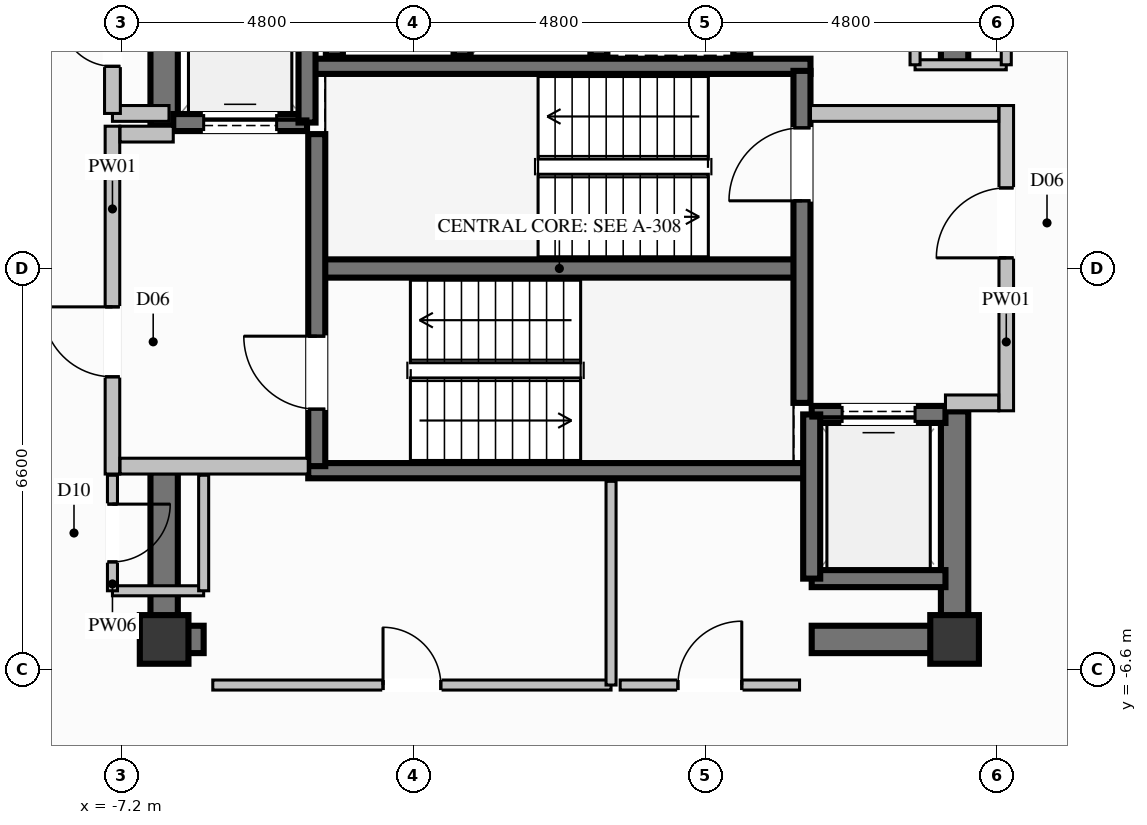
"""IFC4 building model, lengths in metres.
Left out: names, types, materials, properties, quantities, classifications, styles, units other than length and angle.
Written with IfcOpenShell. Run it as: python <this file> out.ifc"""

import sys

from ifc_helpers import new_model, si_unit, direction, frame, frame_2d, origin, origin_2d, place, context, subcontext, project, spatial, rectangle, extrude, element, fill, save


model = new_model("IFC4")
c1 = context("Model", 3, precision=1e-05, world=origin(), true_north=direction((0.0, 1.0)))
c2 = subcontext(c1, "Body", "Model", "MODEL_VIEW")
j1 = project(units=[si_unit("LENGTHUNIT", "METRE"), si_unit("PLANEANGLEUNIT", "RADIAN")], contexts=[c1])
p1 = place(None, origin())
s1 = spatial("IfcSite", under=j1, at=p1, CompositionType="ELEMENT")
p2 = place(p1, origin())
s2 = spatial("IfcBuilding", under=s1, at=p2, CompositionType="ELEMENT")
p3 = place(p2, frame((0.0, 0.0, 258.2)))
s3 = spatial("IfcBuildingStorey", under=s2, at=p3, CompositionType="ELEMENT", Elevation=258.2)
for number, where, z_axis, x_axis in (
    (1, (-6.5, -6.1, 0.0), (0.0, 0.0, 1.0), (1.0, 0.0, 0.0)),
    (2, (6.5, -6.1, 0.0), (0.0, 0.0, 1.0), (1.0, 0.0, 0.0)),
):
    element("IfcColumn", number, at=place(p3, frame(where, z_axis=z_axis, x_axis=x_axis)), inside=s3, PredefinedType="COLUMN", context=c2, shape_type="SweptSolid", body=[
        extrude(rectangle(XDim=0.8, YDim=0.8, at=origin_2d()), origin(), (0.0, 0.0, 1.0), 3.8),
    ])
p4 = place(p3, frame((-3.99, 0.0, 0.0), z_axis=(0.0, 0.0, 1.0), x_axis=(1.0, 0.0, 0.0)))
e3 = element("IfcWall", 3, at=p4, inside=s3, PredefinedType="SHEAR", context=c2, shape_type="SweptSolid", body=[
    extrude(rectangle(XDim=7.98, YDim=0.3, at=frame_2d((3.99, 0.0))), origin(), (0.0, 0.0, 1.0), 3.8),
])
for number, where, z_axis, x_axis in (
    (4, (-4.13, -3.325, 0.0), (0.0, 0.0, 1.0), (1.0, 0.0, 0.0)),
    (5, (-4.13, 3.325, 0.0), (0.0, 0.0, 1.0), (1.0, 0.0, 0.0)),
):
    element("IfcWall", number, at=place(p3, frame(where, z_axis=z_axis, x_axis=x_axis)), inside=s3, PredefinedType="SOLIDWALL", context=c2, shape_type="SweptSolid", body=[
        extrude(rectangle(XDim=8.26, YDim=0.25, at=frame_2d((4.13, 0.0))), origin(), (0.0, 0.0, 1.0), 3.8),
    ])
p5 = place(p3, frame((-6.275, -6.1, 0.0), z_axis=(0.0, 0.0, 1.0), x_axis=(1.0, 0.0, 0.0)))
e6 = element("IfcWall", 6, at=p5, inside=s3, PredefinedType="SHEAR", context=c2, shape_type="SweptSolid", body=[
    extrude(rectangle(XDim=0.425, YDim=0.45, at=frame_2d((0.212, 0.0))), origin(), (0.0, 0.0, 1.0), 3.8),
])
p6 = place(p3, frame((4.15, -6.1, 0.0), z_axis=(0.0, 0.0, 1.0), x_axis=(1.0, 0.0, 0.0)))
e7 = element("IfcWall", 7, at=p6, inside=s3, PredefinedType="SHEAR", context=c2, shape_type="SweptSolid", body=[
    extrude(rectangle(XDim=2.125, YDim=0.45, at=frame_2d((1.062, 0.0))), origin(), (0.0, 0.0, 1.0), 3.8),
])
p7 = place(p3, frame((-6.5, 2.35, 0.0), z_axis=(0.0, 0.0, 1.0), x_axis=(0.0, 1.0, 0.0)))
e8 = element("IfcWall", 8, at=p7, inside=s3, PredefinedType="SHEAR", context=c2, shape_type="SweptSolid", body=[
    extrude(rectangle(XDim=3.975, YDim=0.45, at=frame_2d((1.987, 0.0))), origin(), (0.0, 0.0, 1.0), 3.8),
])
p8 = place(p3, frame((-6.5, -6.325, 0.0), z_axis=(0.0, 0.0, 1.0), x_axis=(0.0, 1.0, 0.0)))
e9 = element("IfcWall", 9, at=p8, inside=s3, PredefinedType="SHEAR", context=c2, shape_type="SweptSolid", body=[
    extrude(rectangle(XDim=2.975, YDim=0.45, at=frame_2d((1.487, 0.0))), origin(), (0.0, 0.0, 1.0), 3.8),
])
p9 = place(p3, frame((6.5, -6.325, 0.0), z_axis=(0.0, 0.0, 1.0), x_axis=(0.0, 1.0, 0.0)))
e10 = element("IfcWall", 10, at=p9, inside=s3, PredefinedType="SHEAR", context=c2, shape_type="SweptSolid", body=[
    extrude(rectangle(XDim=3.975, YDim=0.45, at=frame_2d((1.987, 0.0))), origin(), (0.0, 0.0, 1.0), 3.8),
])
p10 = place(p3, frame((6.5, 3.35, 0.0), z_axis=(0.0, 0.0, 1.0), x_axis=(0.0, 1.0, 0.0)))
e11 = element("IfcWall", 11, at=p10, inside=s3, PredefinedType="SHEAR", context=c2, shape_type="SweptSolid", body=[
    extrude(rectangle(XDim=2.975, YDim=0.45, at=frame_2d((1.487, 0.0))), origin(), (0.0, 0.0, 1.0), 3.8),
])
for number, where, z_axis, x_axis in (
    (12, (-3.7, 6.0, 0.0), (0.0, 0.0, 1.0), (0.0, -1.0, 0.0)),
    (13, (-1.6, 3.5, 0.0), (0.0, 0.0, 1.0), (0.0, 1.0, 0.0)),
    (14, (0.65, 3.5, 0.0), (0.0, 0.0, 1.0), (0.0, 1.0, 0.0)),
    (15, (3.0, 3.5, 0.0), (0.0, 0.0, 1.0), (0.0, 1.0, 0.0)),
):
    element("IfcWall", number, at=place(p3, frame(where, z_axis=z_axis, x_axis=x_axis)), inside=s3, PredefinedType="SOLIDWALL", context=c2, shape_type="SweptSolid", body=[
        extrude(rectangle(XDim=2.5, YDim=0.28, at=frame_2d((1.25, 0.0))), origin(), (0.0, 0.0, 1.0), 3.57),
    ])
p11 = place(p3, frame((-6.35, 2.4, 0.0), z_axis=(0.0, 0.0, 1.0), x_axis=(1.0, 0.0, 0.0)))
e16 = element("IfcWall", 16, at=p11, inside=s3, PredefinedType="SOLIDWALL", context=c2, shape_type="SweptSolid", body=[
    extrude(rectangle(XDim=2.2, YDim=0.28, at=frame_2d((1.1, 0.0))), origin(), (0.0, 0.0, 1.0), 3.57),
])
p12 = place(p11, frame((0.5, 0.0, 0.0)))
e17 = element("IfcOpeningElement", 17, at=p12, cuts=e16, PredefinedType="OPENING", context=c2, shape_type="SweptSolid", body=[
    extrude(rectangle(XDim=1.2, YDim=2.2, at=frame_2d((0.6, 1.1))), frame((0.0, 0.15, 0.0), z_axis=(0.0, -1.0, 0.0), x_axis=(1.0, 0.0, 0.0)), (0.0, 0.0, 1.0), 0.3),
])
p13 = place(p3, frame((-4.15, 2.4, 0.0), z_axis=(0.0, 0.0, 1.0), x_axis=(0.0, 1.0, 0.0)))
e18 = element("IfcWall", 18, at=p13, inside=s3, PredefinedType="SOLIDWALL", context=c2, shape_type="SweptSolid", body=[
    extrude(rectangle(XDim=2.7, YDim=0.28, at=frame_2d((1.35, 0.0))), origin(), (0.0, 0.0, 1.0), 3.57),
])
p14 = place(p3, frame((4.15, -5.1, 0.0), z_axis=(0.0, 0.0, 1.0), x_axis=(1.0, 0.0, 0.0)))
e19 = element("IfcWall", 19, at=p14, inside=s3, PredefinedType="SOLIDWALL", context=c2, shape_type="SweptSolid", body=[
    extrude(rectangle(XDim=2.2, YDim=0.28, at=frame_2d((1.1, 0.0))), origin(), (0.0, 0.0, 1.0), 3.57),
])
p15 = place(p3, frame((6.35, -2.4, 0.0), z_axis=(0.0, 0.0, 1.0), x_axis=(-1.0, 0.0, 0.0)))
e20 = element("IfcWall", 20, at=p15, inside=s3, PredefinedType="SOLIDWALL", context=c2, shape_type="SweptSolid", body=[
    extrude(rectangle(XDim=2.2, YDim=0.28, at=frame_2d((1.1, 0.0))), origin(), (0.0, 0.0, 1.0), 3.57),
])
p16 = place(p15, frame((0.5, 0.0, 0.0)))
e21 = element("IfcOpeningElement", 21, at=p16, cuts=e20, PredefinedType="OPENING", context=c2, shape_type="SweptSolid", body=[
    extrude(rectangle(XDim=1.2, YDim=2.2, at=frame_2d((0.6, 1.1))), frame((0.0, 0.15, 0.0), z_axis=(0.0, -1.0, 0.0), x_axis=(1.0, 0.0, 0.0)), (0.0, 0.0, 1.0), 0.3),
])
p17 = place(p3, frame((4.15, -2.4, 0.0), z_axis=(0.0, 0.0, 1.0), x_axis=(0.0, -1.0, 0.0)))
e22 = element("IfcWall", 22, at=p17, inside=s3, PredefinedType="SOLIDWALL", context=c2, shape_type="SweptSolid", body=[
    extrude(rectangle(XDim=2.7, YDim=0.28, at=frame_2d((1.35, 0.0))), origin(), (0.0, 0.0, 1.0), 3.57),
])
p18 = place(p3, frame((-3.99, -3.25, 0.0), z_axis=(0.0, 0.0, 1.0), x_axis=(0.0, 1.0, 0.0)))
e23 = element("IfcWall", 23, at=p18, inside=s3, PredefinedType="SOLIDWALL", context=c2, shape_type="SweptSolid", body=[
    extrude(rectangle(XDim=5.46, YDim=0.28, at=frame_2d((2.73, 0.0))), origin(), (0.0, 0.0, 1.0), 3.57),
])
p19 = place(p18, frame((0.937, 0.0, 0.0)))
e24 = element("IfcOpeningElement", 24, at=p19, cuts=e23, PredefinedType="OPENING", context=c2, shape_type="SweptSolid", body=[
    extrude(rectangle(XDim=1.2, YDim=2.2, at=frame_2d((0.6, 1.1))), frame((0.0, 0.15, 0.0), z_axis=(0.0, -1.0, 0.0), x_axis=(1.0, 0.0, 0.0)), (0.0, 0.0, 1.0), 0.3),
])
p20 = place(p3, frame((3.99, -2.21, 0.0), z_axis=(0.0, 0.0, 1.0), x_axis=(0.0, 1.0, 0.0)))
e25 = element("IfcWall", 25, at=p20, inside=s3, PredefinedType="SOLIDWALL", context=c2, shape_type="SweptSolid", body=[
    extrude(rectangle(XDim=5.46, YDim=0.28, at=frame_2d((2.73, 0.0))), origin(), (0.0, 0.0, 1.0), 3.57),
])
p21 = place(p20, frame((3.323, 0.0, 0.0)))
e26 = element("IfcOpeningElement", 26, at=p21, cuts=e25, PredefinedType="OPENING", context=c2, shape_type="SweptSolid", body=[
    extrude(rectangle(XDim=1.2, YDim=2.2, at=frame_2d((0.6, 1.1))), frame((0.0, 0.15, 0.0), z_axis=(0.0, -1.0, 0.0), x_axis=(1.0, 0.0, 0.0)), (0.0, 0.0, 1.0), 0.3),
])
p22 = place(p3, frame((-7.35, -3.38, 0.0), z_axis=(0.0, 0.0, 1.0), x_axis=(0.0, 1.0, 0.0)))
e27 = element("IfcWall", 27, at=p22, inside=s3, PredefinedType="PARTITIONING", context=c2, shape_type="SweptSolid", body=[
    extrude(rectangle(XDim=5.72, YDim=0.24, at=frame_2d((2.86, 0.0))), origin(), (0.0, 0.0, 1.0), 2.655),
])
p23 = place(p22, frame((1.599, 0.0, 0.0)))
e28 = element("IfcOpeningElement", 28, at=p23, cuts=e27, PredefinedType="OPENING", context=c2, shape_type="SweptSolid", body=[
    extrude(rectangle(XDim=1.15, YDim=2.2, at=frame_2d((0.575, 1.1))), frame((0.0, 0.13, 0.0), z_axis=(0.0, -1.0, 0.0), x_axis=(1.0, 0.0, 0.0)), (0.0, 0.0, 1.0), 0.26),
])
p24 = place(p3, frame((-7.225, -3.25, 0.0), z_axis=(0.0, 0.0, 1.0), x_axis=(1.0, 0.0, 0.0)))
e29 = element("IfcWall", 29, at=p24, inside=s3, PredefinedType="PARTITIONING", context=c2, shape_type="SweptSolid", body=[
    extrude(rectangle(XDim=3.095, YDim=0.26, at=frame_2d((1.548, 0.0))), origin(), (0.0, 0.0, 1.0), 3.57),
])
p25 = place(p3, frame((-7.225, 2.21, 0.0), z_axis=(0.0, 0.0, 1.0), x_axis=(1.0, 0.0, 0.0)))
e30 = element("IfcWall", 30, at=p25, inside=s3, PredefinedType="PARTITIONING", context=c2, shape_type="SweptSolid", body=[
    extrude(rectangle(XDim=0.875, YDim=0.26, at=frame_2d((0.438, 0.0))), origin(), (0.0, 0.0, 1.0), 3.57),
])
p26 = place(p3, frame((7.35, -2.34, 0.0), z_axis=(0.0, 0.0, 1.0), x_axis=(0.0, 1.0, 0.0)))
e31 = element("IfcWall", 31, at=p26, inside=s3, PredefinedType="PARTITIONING", context=c2, shape_type="SweptSolid", body=[
    extrude(rectangle(XDim=5.02, YDim=0.24, at=frame_2d((2.51, 0.0))), origin(), (0.0, 0.0, 1.0), 2.655),
])
p27 = place(p26, frame((2.515, 0.0, 0.0)))
e32 = element("IfcOpeningElement", 32, at=p27, cuts=e31, PredefinedType="OPENING", context=c2, shape_type="SweptSolid", body=[
    extrude(rectangle(XDim=1.15, YDim=2.2, at=frame_2d((0.575, 1.1))), frame((0.0, 0.13, 0.0), z_axis=(0.0, -1.0, 0.0), x_axis=(1.0, 0.0, 0.0)), (0.0, 0.0, 1.0), 0.26),
])
p28 = place(p3, frame((6.35, -2.21, 0.0), z_axis=(0.0, 0.0, 1.0), x_axis=(1.0, 0.0, 0.0)))
e33 = element("IfcWall", 33, at=p28, inside=s3, PredefinedType="PARTITIONING", context=c2, shape_type="SweptSolid", body=[
    extrude(rectangle(XDim=0.875, YDim=0.26, at=frame_2d((0.438, 0.0))), origin(), (0.0, 0.0, 1.0), 3.57),
])
p29 = place(p3, frame((4.13, 2.55, 0.0), z_axis=(0.0, 0.0, 1.0), x_axis=(1.0, 0.0, 0.0)))
e34 = element("IfcWall", 34, at=p29, inside=s3, PredefinedType="PARTITIONING", context=c2, shape_type="SweptSolid", body=[
    extrude(rectangle(XDim=3.095, YDim=0.26, at=frame_2d((1.548, 0.0))), origin(), (0.0, 0.0, 1.0), 3.57),
])
p30 = place(p3, frame((-7.35, 2.55, 0.0), z_axis=(0.0, 0.0, 1.0), x_axis=(1.0, 0.0, 0.0)))
e35 = element("IfcWall", 35, at=p30, inside=s3, PredefinedType="PARTITIONING", context=c2, shape_type="SweptSolid", body=[
    extrude(rectangle(XDim=0.93, YDim=0.26, at=frame_2d((0.465, 0.0))), origin(), (0.0, 0.0, 1.0), 3.57),
])
p31 = place(p3, frame((-7.35, 2.55, 0.0), z_axis=(0.0, 0.0, 1.0), x_axis=(0.0, 1.0, 0.0)))
e36 = element("IfcWall", 36, at=p31, inside=s3, PredefinedType="PARTITIONING", context=c2, shape_type="SweptSolid", body=[
    extrude(rectangle(XDim=2.4, YDim=0.26, at=frame_2d((1.2, 0.0))), origin(), (0.0, 0.0, 1.0), 2.655),
])
p32 = place(p31, frame((0.775, 0.0, 0.0)))
e37 = element("IfcOpeningElement", 37, at=p32, cuts=e36, PredefinedType="OPENING", context=c2, shape_type="SweptSolid", body=[
    extrude(rectangle(XDim=0.85, YDim=2.05, at=frame_2d((0.425, 1.025))), frame((0.0, 0.14, 0.0), z_axis=(0.0, -1.0, 0.0), x_axis=(1.0, 0.0, 0.0)), (0.0, 0.0, 1.0), 0.28),
])
p33 = place(p3, frame((-7.35, -5.3, 0.0), z_axis=(0.0, 0.0, 1.0), x_axis=(1.0, 0.0, 0.0)))
e38 = element("IfcWall", 38, at=p33, inside=s3, PredefinedType="PARTITIONING", context=c2, shape_type="SweptSolid", body=[
    extrude(rectangle(XDim=1.5, YDim=0.165, at=frame_2d((0.75, 0.0))), origin(), (0.0, 0.0, 1.0), 2.655),
])
p34 = place(p3, frame((-5.85, -5.3, 0.0), z_axis=(0.0, 0.0, 1.0), x_axis=(0.0, 1.0, 0.0)))
e39 = element("IfcWall", 39, at=p34, inside=s3, PredefinedType="PARTITIONING", context=c2, shape_type="SweptSolid", body=[
    extrude(rectangle(XDim=1.9, YDim=0.165, at=frame_2d((0.95, 0.0))), origin(), (0.0, 0.0, 1.0), 2.655),
])
p35 = place(p3, frame((-7.35, -3.4, 0.0), z_axis=(0.0, 0.0, 1.0), x_axis=(0.0, -1.0, 0.0)))
e40 = element("IfcWall", 40, at=p35, inside=s3, PredefinedType="PARTITIONING", context=c2, shape_type="SweptSolid", body=[
    extrude(rectangle(XDim=1.9, YDim=0.165, at=frame_2d((0.95, 0.0))), origin(), (0.0, 0.0, 1.0), 3.57),
])
p36 = place(p35, frame((0.475, 0.0, 0.0)))
e41 = element("IfcOpeningElement", 41, at=p36, cuts=e40, PredefinedType="OPENING", context=c2, shape_type="SweptSolid", body=[
    extrude(rectangle(XDim=0.95, YDim=2.1, at=frame_2d((0.475, 1.05))), frame((0.0, 0.093, 0.0), z_axis=(0.0, -1.0, 0.0), x_axis=(1.0, 0.0, 0.0)), (0.0, 0.0, 1.0), 0.185),
])
p37 = place(p3, frame((5.85, 3.35, 0.0), z_axis=(0.0, 0.0, 1.0), x_axis=(1.0, 0.0, 0.0)))
e42 = element("IfcWall", 42, at=p37, inside=s3, PredefinedType="PARTITIONING", context=c2, shape_type="SweptSolid", body=[
    extrude(rectangle(XDim=1.5, YDim=0.165, at=frame_2d((0.75, 0.0))), origin(), (0.0, 0.0, 1.0), 3.57),
])
p38 = place(p3, frame((7.35, 3.35, 0.0), z_axis=(0.0, 0.0, 1.0), x_axis=(0.0, 1.0, 0.0)))
e43 = element("IfcWall", 43, at=p38, inside=s3, PredefinedType="PARTITIONING", context=c2, shape_type="SweptSolid", body=[
    extrude(rectangle(XDim=1.95, YDim=0.165, at=frame_2d((0.975, 0.0))), origin(), (0.0, 0.0, 1.0), 3.57),
])
p39 = place(p38, frame((0.5, 0.0, 0.0)))
e44 = element("IfcOpeningElement", 44, at=p39, cuts=e43, PredefinedType="OPENING", context=c2, shape_type="SweptSolid", body=[
    extrude(rectangle(XDim=0.95, YDim=2.1, at=frame_2d((0.475, 1.05))), frame((0.0, 0.093, 0.0), z_axis=(0.0, -1.0, 0.0), x_axis=(1.0, 0.0, 0.0)), (0.0, 0.0, 1.0), 0.185),
])
p40 = place(p3, frame((5.85, 5.3, 0.0), z_axis=(0.0, 0.0, 1.0), x_axis=(0.0, -1.0, 0.0)))
e45 = element("IfcWall", 45, at=p40, inside=s3, PredefinedType="PARTITIONING", context=c2, shape_type="SweptSolid", body=[
    extrude(rectangle(XDim=1.95, YDim=0.165, at=frame_2d((0.975, 0.0))), origin(), (0.0, 0.0, 1.0), 2.655),
])
p41 = place(p3, frame((-5.7, -6.85, 0.0), z_axis=(0.0, 0.0, 1.0), x_axis=(1.0, 0.0, 0.0)))
e46 = element("IfcWall", 46, at=p41, inside=s3, PredefinedType="PARTITIONING", context=c2, shape_type="SweptSolid", body=[
    extrude(rectangle(XDim=6.55, YDim=0.165, at=frame_2d((3.275, 0.0))), origin(), (0.0, 0.0, 1.0), 2.655),
])
p42 = place(p41, frame((2.8, 0.0, 0.0)))
e47 = element("IfcOpeningElement", 47, at=p42, cuts=e46, PredefinedType="OPENING", context=c2, shape_type="SweptSolid", body=[
    extrude(rectangle(XDim=0.95, YDim=2.1, at=frame_2d((0.475, 1.05))), frame((0.0, 0.093, 0.0), z_axis=(0.0, -1.0, 0.0), x_axis=(1.0, 0.0, 0.0)), (0.0, 0.0, 1.0), 0.185),
])
p43 = place(p3, frame((0.85, -6.85, 0.0), z_axis=(0.0, 0.0, 1.0), x_axis=(0.0, 1.0, 0.0)))
e48 = element("IfcWall", 48, at=p43, inside=s3, PredefinedType="PARTITIONING", context=c2, shape_type="SweptSolid", body=[
    extrude(rectangle(XDim=3.35, YDim=0.165, at=frame_2d((1.675, 0.0))), origin(), (0.0, 0.0, 1.0), 2.449),
])
p44 = place(p3, frame((1.0, -6.85, 0.0), z_axis=(0.0, 0.0, 1.0), x_axis=(1.0, 0.0, 0.0)))
e49 = element("IfcWall", 49, at=p44, inside=s3, PredefinedType="PARTITIONING", context=c2, shape_type="SweptSolid", body=[
    extrude(rectangle(XDim=2.95, YDim=0.165, at=frame_2d((1.475, 0.0))), origin(), (0.0, 0.0, 1.0), 2.655),
])
p45 = place(p44, frame((0.95, 0.0, 0.0)))
e50 = element("IfcOpeningElement", 50, at=p45, cuts=e49, PredefinedType="OPENING", context=c2, shape_type="SweptSolid", body=[
    extrude(rectangle(XDim=1.05, YDim=2.15, at=frame_2d((0.525, 1.075))), frame((0.0, 0.093, 0.0), z_axis=(0.0, -1.0, 0.0), x_axis=(1.0, 0.0, 0.0)), (0.0, 0.0, 1.0), 0.185),
])
p46 = place(p12, origin())
e51 = element("IfcDoor", 51, at=p46, inside=s3, OperationType="SLIDING_TO_LEFT", PredefinedType="DOOR", context=c2, shape_type="SweptSolid", body=[
    extrude(rectangle(XDim=1.2, YDim=2.2, at=frame_2d((0.6, 1.1))), frame((0.0, 0.025, 0.0), z_axis=(0.0, -1.0, 0.0), x_axis=(1.0, 0.0, 0.0)), (0.0, 0.0, 1.0), 0.05),
])
fill(e17, e51)
p47 = place(p16, origin())
e52 = element("IfcDoor", 52, at=p47, inside=s3, OperationType="SLIDING_TO_LEFT", PredefinedType="DOOR", context=c2, shape_type="SweptSolid", body=[
    extrude(rectangle(XDim=1.2, YDim=2.2, at=frame_2d((0.6, 1.1))), frame((0.0, 0.025, 0.0), z_axis=(0.0, -1.0, 0.0), x_axis=(1.0, 0.0, 0.0)), (0.0, 0.0, 1.0), 0.05),
])
fill(e21, e52)
p48 = place(p19, origin())
e53 = element("IfcDoor", 53, at=p48, inside=s3, OperationType="SINGLE_SWING_RIGHT", PredefinedType="DOOR", context=c2, shape_type="SweptSolid", body=[
    extrude(rectangle(XDim=1.2, YDim=2.2, at=frame_2d((0.6, 1.1))), frame((0.0, 0.025, 0.0), z_axis=(0.0, -1.0, 0.0), x_axis=(1.0, 0.0, 0.0)), (0.0, 0.0, 1.0), 0.05),
])
fill(e24, e53)
p49 = place(p21, origin())
e54 = element("IfcDoor", 54, at=p49, inside=s3, OperationType="SINGLE_SWING_LEFT", PredefinedType="DOOR", context=c2, shape_type="SweptSolid", body=[
    extrude(rectangle(XDim=1.2, YDim=2.2, at=frame_2d((0.6, 1.1))), frame((0.0, 0.025, 0.0), z_axis=(0.0, -1.0, 0.0), x_axis=(1.0, 0.0, 0.0)), (0.0, 0.0, 1.0), 0.05),
])
fill(e26, e54)
p50 = place(p23, origin())
e55 = element("IfcDoor", 55, at=p50, inside=s3, OperationType="SINGLE_SWING_RIGHT", PredefinedType="DOOR", context=c2, shape_type="SweptSolid", body=[
    extrude(rectangle(XDim=1.15, YDim=2.2, at=frame_2d((0.575, 1.1))), frame((0.0, 0.025, 0.0), z_axis=(0.0, -1.0, 0.0), x_axis=(1.0, 0.0, 0.0)), (0.0, 0.0, 1.0), 0.05),
])
fill(e28, e55)
p51 = place(p27, origin())
e56 = element("IfcDoor", 56, at=p51, inside=s3, OperationType="SINGLE_SWING_LEFT", PredefinedType="DOOR", context=c2, shape_type="SweptSolid", body=[
    extrude(rectangle(XDim=1.15, YDim=2.2, at=frame_2d((0.575, 1.1))), frame((0.0, 0.025, 0.0), z_axis=(0.0, -1.0, 0.0), x_axis=(1.0, 0.0, 0.0)), (0.0, 0.0, 1.0), 0.05),
])
fill(e32, e56)
p52 = place(p32, origin())
e57 = element("IfcDoor", 57, at=p52, inside=s3, OperationType="SINGLE_SWING_RIGHT", PredefinedType="DOOR", context=c2, shape_type="SweptSolid", body=[
    extrude(rectangle(XDim=0.85, YDim=2.05, at=frame_2d((0.425, 1.025))), frame((0.0, 0.025, 0.0), z_axis=(0.0, -1.0, 0.0), x_axis=(1.0, 0.0, 0.0)), (0.0, 0.0, 1.0), 0.05),
])
fill(e37, e57)
p53 = place(p36, origin())
e58 = element("IfcDoor", 58, at=p53, inside=s3, OperationType="SINGLE_SWING_LEFT", PredefinedType="DOOR", context=c2, shape_type="SweptSolid", body=[
    extrude(rectangle(XDim=0.95, YDim=2.1, at=frame_2d((0.475, 1.05))), frame((0.0, 0.025, 0.0), z_axis=(0.0, -1.0, 0.0), x_axis=(1.0, 0.0, 0.0)), (0.0, 0.0, 1.0), 0.05),
])
fill(e41, e58)
p54 = place(p42, origin())
e59 = element("IfcDoor", 59, at=p54, inside=s3, OperationType="SINGLE_SWING_LEFT", PredefinedType="DOOR", context=c2, shape_type="SweptSolid", body=[
    extrude(rectangle(XDim=0.95, YDim=2.1, at=frame_2d((0.475, 1.05))), frame((0.0, 0.025, 0.0), z_axis=(0.0, -1.0, 0.0), x_axis=(1.0, 0.0, 0.0)), (0.0, 0.0, 1.0), 0.05),
])
fill(e47, e59)
p55 = place(p45, origin())
e60 = element("IfcDoor", 60, at=p55, inside=s3, OperationType="SINGLE_SWING_RIGHT", PredefinedType="DOOR", context=c2, shape_type="SweptSolid", body=[
    extrude(rectangle(XDim=1.05, YDim=2.15, at=frame_2d((0.525, 1.075))), frame((0.0, 0.025, 0.0), z_axis=(0.0, -1.0, 0.0), x_axis=(1.0, 0.0, 0.0)), (0.0, 0.0, 1.0), 0.05),
])
fill(e50, e60)
save(model, sys.argv[1])
